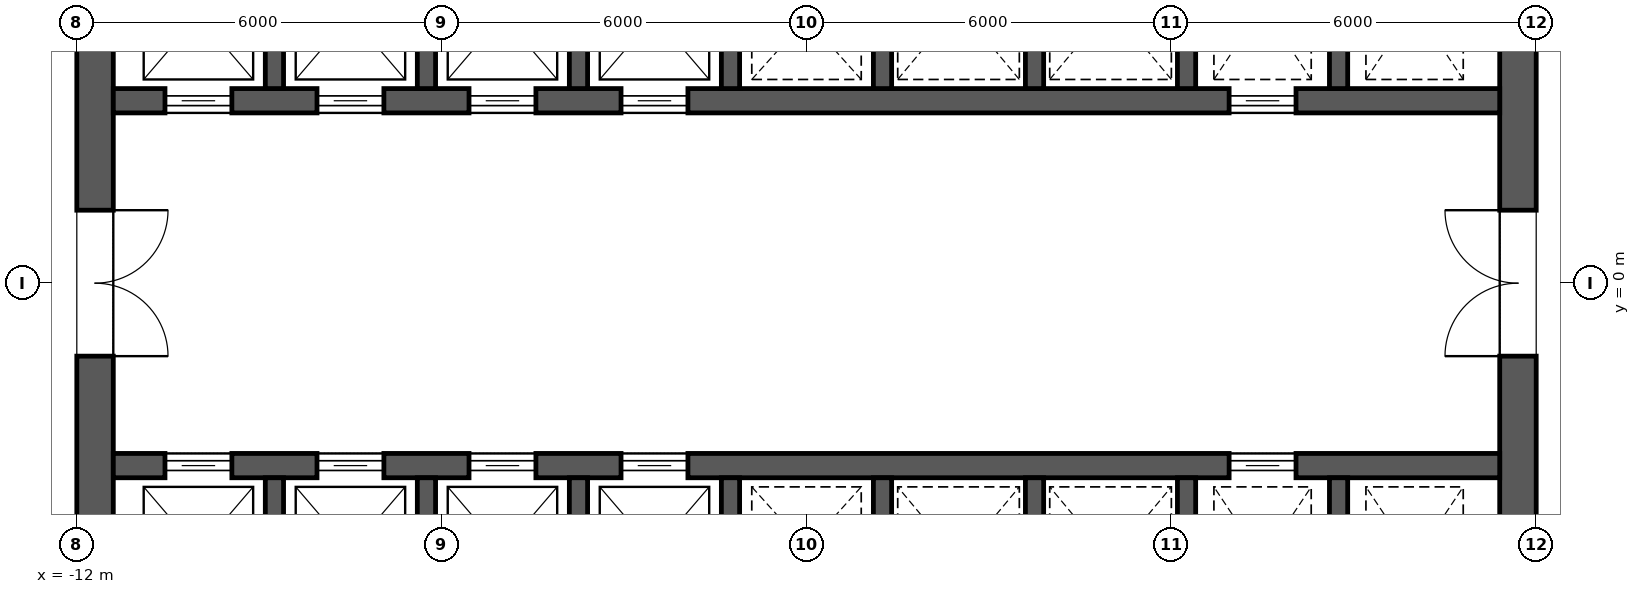
"""IFC4 building model, lengths in metres.
Left out: names, types, materials, properties, quantities, classifications, styles, units other than length and angle.
Written with IfcOpenShell. Run it as: python <this file> out.ifc"""

import sys

from ifc_helpers import new_model, si_unit, direction, frame, frame_2d, origin, place, context, subcontext, project, spatial, rectangle, extrude, element, fill, save


model = new_model("IFC4")
c1 = context("Model", 3, precision=1e-05, world=origin(), true_north=direction((0.0, 1.0)))
c2 = subcontext(c1, "Body", "Model", "MODEL_VIEW")
j1 = project(units=[si_unit("LENGTHUNIT", "METRE"), si_unit("PLANEANGLEUNIT", "RADIAN")], contexts=[c1])
p1 = place(None, origin())
s1 = spatial("IfcSite", under=j1, at=p1, CompositionType="ELEMENT")
p2 = place(p1, origin())
s2 = spatial("IfcBuilding", under=s1, at=p2, CompositionType="ELEMENT")
p3 = place(p2, frame((0.0, 0.0, 163.3)))
s3 = spatial("IfcBuildingStorey", under=s2, at=p3, CompositionType="ELEMENT", Elevation=163.3)
p4 = place(p3, frame((11.7, -11.4, 0.0), z_axis=(0.0, 0.0, 1.0), x_axis=(0.0, 1.0, 0.0)))
e1 = element("IfcWall", 1, at=p4, inside=s3, PredefinedType="SHEAR", context=c2, shape_type="SweptSolid", body=[
    extrude(rectangle(XDim=22.8, YDim=0.6, at=frame_2d((11.4, 0.0))), origin(), (0.0, 0.0, 1.0), 4.2),
])
p5 = place(p4, frame((10.2, 0.0, 0.0)))
e2 = element("IfcOpeningElement", 2, at=p5, cuts=e1, PredefinedType="OPENING", context=c2, shape_type="SweptSolid", body=[
    extrude(rectangle(XDim=2.4, YDim=2.1, at=frame_2d((1.2, 1.05))), frame((0.0, 0.312, 0.0), z_axis=(0.0, -1.0, 0.0), x_axis=(1.0, 0.0, 0.0)), (0.0, 0.0, 1.0), 0.624),
])
p6 = place(p4, frame((19.5, 0.0, 0.0)))
e3 = element("IfcOpeningElement", 3, at=p6, cuts=e1, PredefinedType="OPENING", context=c2, shape_type="SweptSolid", body=[
    extrude(rectangle(XDim=1.2, YDim=2.1, at=frame_2d((0.6, 1.05))), frame((0.0, 0.312, 0.0), z_axis=(0.0, -1.0, 0.0), x_axis=(1.0, 0.0, 0.0)), (0.0, 0.0, 1.0), 0.624),
])
p7 = place(p4, frame((2.1, 0.0, 0.0)))
e4 = element("IfcOpeningElement", 4, at=p7, cuts=e1, PredefinedType="OPENING", context=c2, shape_type="SweptSolid", body=[
    extrude(rectangle(XDim=1.2, YDim=2.1, at=frame_2d((0.6, 1.05))), frame((0.0, 0.312, 0.0), z_axis=(0.0, -1.0, 0.0), x_axis=(1.0, 0.0, 0.0)), (0.0, 0.0, 1.0), 0.624),
])
p8 = place(p3, frame((-11.7, -11.4, 0.0), z_axis=(0.0, 0.0, 1.0), x_axis=(0.0, 1.0, 0.0)))
e5 = element("IfcWall", 5, at=p8, inside=s3, PredefinedType="SHEAR", context=c2, shape_type="SweptSolid", body=[
    extrude(rectangle(XDim=22.8, YDim=0.6, at=frame_2d((11.4, 0.0))), origin(), (0.0, 0.0, 1.0), 4.2),
])
p9 = place(p8, frame((10.2, 0.0, 0.0)))
e6 = element("IfcOpeningElement", 6, at=p9, cuts=e5, PredefinedType="OPENING", context=c2, shape_type="SweptSolid", body=[
    extrude(rectangle(XDim=2.4, YDim=2.1, at=frame_2d((1.2, 1.05))), frame((0.0, 0.312, 0.0), z_axis=(0.0, -1.0, 0.0), x_axis=(1.0, 0.0, 0.0)), (0.0, 0.0, 1.0), 0.624),
])
p10 = place(p8, frame((18.925, 0.0, 0.0)))
e7 = element("IfcOpeningElement", 7, at=p10, cuts=e5, PredefinedType="OPENING", context=c2, shape_type="SweptSolid", body=[
    extrude(rectangle(XDim=1.2, YDim=2.1, at=frame_2d((0.6, 1.05))), frame((0.0, 0.312, 0.0), z_axis=(0.0, -1.0, 0.0), x_axis=(1.0, 0.0, 0.0)), (0.0, 0.0, 1.0), 0.624),
])
p11 = place(p8, frame((2.675, 0.0, 0.0)))
e8 = element("IfcOpeningElement", 8, at=p11, cuts=e5, PredefinedType="OPENING", context=c2, shape_type="SweptSolid", body=[
    extrude(rectangle(XDim=1.2, YDim=2.1, at=frame_2d((0.6, 1.05))), frame((0.0, 0.312, 0.0), z_axis=(0.0, -1.0, 0.0), x_axis=(1.0, 0.0, 0.0)), (0.0, 0.0, 1.0), 0.624),
])
p12 = place(p3, frame((-11.4, 3.0, 0.0), z_axis=(0.0, 0.0, 1.0), x_axis=(1.0, 0.0, 0.0)))
e9 = element("IfcWall", 9, at=p12, inside=s3, PredefinedType="SHEAR", context=c2, shape_type="SweptSolid", body=[
    extrude(rectangle(XDim=22.8, YDim=0.4, at=frame_2d((11.4, 0.0))), origin(), (0.0, 0.0, 1.0), 4.2),
])
p13 = place(p12, frame((0.85, 0.0, 0.0)))
e10 = element("IfcOpeningElement", 10, at=p13, cuts=e9, PredefinedType="OPENING", context=c2, shape_type="SweptSolid", body=[
    extrude(rectangle(XDim=1.1, YDim=2.1, at=frame_2d((0.55, 1.05))), frame((0.0, 0.212, 0.0), z_axis=(0.0, -1.0, 0.0), x_axis=(1.0, 0.0, 0.0)), (0.0, 0.0, 1.0), 0.424),
])
p14 = place(p12, frame((3.35, 0.0, 0.0)))
e11 = element("IfcOpeningElement", 11, at=p14, cuts=e9, PredefinedType="OPENING", context=c2, shape_type="SweptSolid", body=[
    extrude(rectangle(XDim=1.1, YDim=2.1, at=frame_2d((0.55, 1.05))), frame((0.0, 0.212, 0.0), z_axis=(0.0, -1.0, 0.0), x_axis=(1.0, 0.0, 0.0)), (0.0, 0.0, 1.0), 0.424),
])
p15 = place(p12, frame((5.85, 0.0, 0.0)))
e12 = element("IfcOpeningElement", 12, at=p15, cuts=e9, PredefinedType="OPENING", context=c2, shape_type="SweptSolid", body=[
    extrude(rectangle(XDim=1.1, YDim=2.1, at=frame_2d((0.55, 1.05))), frame((0.0, 0.212, 0.0), z_axis=(0.0, -1.0, 0.0), x_axis=(1.0, 0.0, 0.0)), (0.0, 0.0, 1.0), 0.424),
])
p16 = place(p12, frame((8.35, 0.0, 0.0)))
e13 = element("IfcOpeningElement", 13, at=p16, cuts=e9, PredefinedType="OPENING", context=c2, shape_type="SweptSolid", body=[
    extrude(rectangle(XDim=1.1, YDim=2.1, at=frame_2d((0.55, 1.05))), frame((0.0, 0.212, 0.0), z_axis=(0.0, -1.0, 0.0), x_axis=(1.0, 0.0, 0.0)), (0.0, 0.0, 1.0), 0.424),
])
p17 = place(p12, frame((18.35, 0.0, 0.0)))
e14 = element("IfcOpeningElement", 14, at=p17, cuts=e9, PredefinedType="OPENING", context=c2, shape_type="SweptSolid", body=[
    extrude(rectangle(XDim=1.1, YDim=2.1, at=frame_2d((0.55, 1.05))), frame((0.0, 0.212, 0.0), z_axis=(0.0, -1.0, 0.0), x_axis=(1.0, 0.0, 0.0)), (0.0, 0.0, 1.0), 0.424),
])
for number, where, z_axis, x_axis in (
    (15, (-8.75, 3.2, 0.0), (0.0, 0.0, 1.0), (0.0, 1.0, 0.0)),
    (16, (-6.25, 3.2, 0.0), (0.0, 0.0, 1.0), (0.0, 1.0, 0.0)),
    (17, (-3.75, 3.2, 0.0), (0.0, 0.0, 1.0), (0.0, 1.0, 0.0)),
    (18, (-1.25, 3.2, 0.0), (0.0, 0.0, 1.0), (0.0, 1.0, 0.0)),
    (19, (1.25, 3.2, 0.0), (0.0, 0.0, 1.0), (0.0, 1.0, 0.0)),
    (20, (3.75, 3.2, 0.0), (0.0, 0.0, 1.0), (0.0, 1.0, 0.0)),
    (21, (6.25, 3.2, 0.0), (0.0, 0.0, 1.0), (0.0, 1.0, 0.0)),
    (22, (8.75, 3.2, 0.0), (0.0, 0.0, 1.0), (0.0, 1.0, 0.0)),
):
    element("IfcWall", number, at=place(p3, frame(where, z_axis=z_axis, x_axis=x_axis)), inside=s3, PredefinedType="SHEAR", context=c2, shape_type="SweptSolid", body=[
        extrude(rectangle(XDim=2.9, YDim=0.3, at=frame_2d((1.45, 0.0))), origin(), (0.0, 0.0, 1.0), 4.2),
    ])
p18 = place(p3, frame((-11.4, -3.0, 0.0), z_axis=(0.0, 0.0, 1.0), x_axis=(1.0, 0.0, 0.0)))
e23 = element("IfcWall", 23, at=p18, inside=s3, PredefinedType="SHEAR", context=c2, shape_type="SweptSolid", body=[
    extrude(rectangle(XDim=22.8, YDim=0.4, at=frame_2d((11.4, 0.0))), origin(), (0.0, 0.0, 1.0), 4.2),
])
p19 = place(p18, frame((0.85, 0.0, 0.0)))
e24 = element("IfcOpeningElement", 24, at=p19, cuts=e23, PredefinedType="OPENING", context=c2, shape_type="SweptSolid", body=[
    extrude(rectangle(XDim=1.1, YDim=2.1, at=frame_2d((0.55, 1.05))), frame((0.0, 0.212, 0.0), z_axis=(0.0, -1.0, 0.0), x_axis=(1.0, 0.0, 0.0)), (0.0, 0.0, 1.0), 0.424),
])
p20 = place(p18, frame((3.35, 0.0, 0.0)))
e25 = element("IfcOpeningElement", 25, at=p20, cuts=e23, PredefinedType="OPENING", context=c2, shape_type="SweptSolid", body=[
    extrude(rectangle(XDim=1.1, YDim=2.1, at=frame_2d((0.55, 1.05))), frame((0.0, 0.212, 0.0), z_axis=(0.0, -1.0, 0.0), x_axis=(1.0, 0.0, 0.0)), (0.0, 0.0, 1.0), 0.424),
])
p21 = place(p18, frame((5.85, 0.0, 0.0)))
e26 = element("IfcOpeningElement", 26, at=p21, cuts=e23, PredefinedType="OPENING", context=c2, shape_type="SweptSolid", body=[
    extrude(rectangle(XDim=1.1, YDim=2.1, at=frame_2d((0.55, 1.05))), frame((0.0, 0.212, 0.0), z_axis=(0.0, -1.0, 0.0), x_axis=(1.0, 0.0, 0.0)), (0.0, 0.0, 1.0), 0.424),
])
p22 = place(p18, frame((8.35, 0.0, 0.0)))
e27 = element("IfcOpeningElement", 27, at=p22, cuts=e23, PredefinedType="OPENING", context=c2, shape_type="SweptSolid", body=[
    extrude(rectangle(XDim=1.1, YDim=2.1, at=frame_2d((0.55, 1.05))), frame((0.0, 0.212, 0.0), z_axis=(0.0, -1.0, 0.0), x_axis=(1.0, 0.0, 0.0)), (0.0, 0.0, 1.0), 0.424),
])
p23 = place(p18, frame((18.35, 0.0, 0.0)))
e28 = element("IfcOpeningElement", 28, at=p23, cuts=e23, PredefinedType="OPENING", context=c2, shape_type="SweptSolid", body=[
    extrude(rectangle(XDim=1.1, YDim=2.1, at=frame_2d((0.55, 1.05))), frame((0.0, 0.212, 0.0), z_axis=(0.0, -1.0, 0.0), x_axis=(1.0, 0.0, 0.0)), (0.0, 0.0, 1.0), 0.424),
])
for number, where, z_axis, x_axis in (
    (29, (-8.75, -6.1, 0.0), (0.0, 0.0, 1.0), (0.0, 1.0, 0.0)),
    (30, (-6.25, -6.1, 0.0), (0.0, 0.0, 1.0), (0.0, 1.0, 0.0)),
    (31, (-3.75, -6.1, 0.0), (0.0, 0.0, 1.0), (0.0, 1.0, 0.0)),
    (32, (-1.25, -6.1, 0.0), (0.0, 0.0, 1.0), (0.0, 1.0, 0.0)),
    (33, (1.25, -6.1, 0.0), (0.0, 0.0, 1.0), (0.0, 1.0, 0.0)),
    (34, (3.75, -6.1, 0.0), (0.0, 0.0, 1.0), (0.0, 1.0, 0.0)),
    (35, (6.25, -6.1, 0.0), (0.0, 0.0, 1.0), (0.0, 1.0, 0.0)),
    (36, (8.75, -6.1, 0.0), (0.0, 0.0, 1.0), (0.0, 1.0, 0.0)),
):
    element("IfcWall", number, at=place(p3, frame(where, z_axis=z_axis, x_axis=x_axis)), inside=s3, PredefinedType="SHEAR", context=c2, shape_type="SweptSolid", body=[
        extrude(rectangle(XDim=2.9, YDim=0.3, at=frame_2d((1.45, 0.0))), origin(), (0.0, 0.0, 1.0), 4.2),
    ])
p24 = place(p13, origin())
e37 = element("IfcDoor", 37, at=p24, inside=s3, OperationType="SLIDING_TO_LEFT", PredefinedType="DOOR", context=c2, shape_type="SweptSolid", body=[
    extrude(rectangle(XDim=1.1, YDim=2.1, at=frame_2d((0.55, 1.05))), frame((0.0, 0.025, 0.0), z_axis=(0.0, -1.0, 0.0), x_axis=(1.0, 0.0, 0.0)), (0.0, 0.0, 1.0), 0.05),
])
fill(e10, e37)
p25 = place(p14, origin())
e38 = element("IfcDoor", 38, at=p25, inside=s3, OperationType="SLIDING_TO_LEFT", PredefinedType="DOOR", context=c2, shape_type="SweptSolid", body=[
    extrude(rectangle(XDim=1.1, YDim=2.1, at=frame_2d((0.55, 1.05))), frame((0.0, 0.025, 0.0), z_axis=(0.0, -1.0, 0.0), x_axis=(1.0, 0.0, 0.0)), (0.0, 0.0, 1.0), 0.05),
])
fill(e11, e38)
p26 = place(p15, origin())
e39 = element("IfcDoor", 39, at=p26, inside=s3, OperationType="SLIDING_TO_LEFT", PredefinedType="DOOR", context=c2, shape_type="SweptSolid", body=[
    extrude(rectangle(XDim=1.1, YDim=2.1, at=frame_2d((0.55, 1.05))), frame((0.0, 0.025, 0.0), z_axis=(0.0, -1.0, 0.0), x_axis=(1.0, 0.0, 0.0)), (0.0, 0.0, 1.0), 0.05),
])
fill(e12, e39)
p27 = place(p16, origin())
e40 = element("IfcDoor", 40, at=p27, inside=s3, OperationType="SLIDING_TO_LEFT", PredefinedType="DOOR", context=c2, shape_type="SweptSolid", body=[
    extrude(rectangle(XDim=1.1, YDim=2.1, at=frame_2d((0.55, 1.05))), frame((0.0, 0.025, 0.0), z_axis=(0.0, -1.0, 0.0), x_axis=(1.0, 0.0, 0.0)), (0.0, 0.0, 1.0), 0.05),
])
fill(e13, e40)
p28 = place(p19, origin())
e41 = element("IfcDoor", 41, at=p28, inside=s3, OperationType="SLIDING_TO_LEFT", PredefinedType="DOOR", context=c2, shape_type="SweptSolid", body=[
    extrude(rectangle(XDim=1.1, YDim=2.1, at=frame_2d((0.55, 1.05))), frame((0.0, 0.025, 0.0), z_axis=(0.0, -1.0, 0.0), x_axis=(1.0, 0.0, 0.0)), (0.0, 0.0, 1.0), 0.05),
])
fill(e24, e41)
p29 = place(p20, origin())
e42 = element("IfcDoor", 42, at=p29, inside=s3, OperationType="SLIDING_TO_LEFT", PredefinedType="DOOR", context=c2, shape_type="SweptSolid", body=[
    extrude(rectangle(XDim=1.1, YDim=2.1, at=frame_2d((0.55, 1.05))), frame((0.0, 0.025, 0.0), z_axis=(0.0, -1.0, 0.0), x_axis=(1.0, 0.0, 0.0)), (0.0, 0.0, 1.0), 0.05),
])
fill(e25, e42)
p30 = place(p21, origin())
e43 = element("IfcDoor", 43, at=p30, inside=s3, OperationType="SLIDING_TO_LEFT", PredefinedType="DOOR", context=c2, shape_type="SweptSolid", body=[
    extrude(rectangle(XDim=1.1, YDim=2.1, at=frame_2d((0.55, 1.05))), frame((0.0, 0.025, 0.0), z_axis=(0.0, -1.0, 0.0), x_axis=(1.0, 0.0, 0.0)), (0.0, 0.0, 1.0), 0.05),
])
fill(e26, e43)
p31 = place(p22, origin())
e44 = element("IfcDoor", 44, at=p31, inside=s3, OperationType="SLIDING_TO_LEFT", PredefinedType="DOOR", context=c2, shape_type="SweptSolid", body=[
    extrude(rectangle(XDim=1.1, YDim=2.1, at=frame_2d((0.55, 1.05))), frame((0.0, 0.025, 0.0), z_axis=(0.0, -1.0, 0.0), x_axis=(1.0, 0.0, 0.0)), (0.0, 0.0, 1.0), 0.05),
])
fill(e27, e44)
p32 = place(p17, origin())
e45 = element("IfcDoor", 45, at=p32, inside=s3, OperationType="SLIDING_TO_LEFT", PredefinedType="DOOR", context=c2, shape_type="SweptSolid", body=[
    extrude(rectangle(XDim=1.1, YDim=2.1, at=frame_2d((0.55, 1.05))), frame((0.0, 0.025, 0.0), z_axis=(0.0, -1.0, 0.0), x_axis=(1.0, 0.0, 0.0)), (0.0, 0.0, 1.0), 0.05),
])
fill(e14, e45)
p33 = place(p23, origin())
e46 = element("IfcDoor", 46, at=p33, inside=s3, OperationType="SLIDING_TO_LEFT", PredefinedType="DOOR", context=c2, shape_type="SweptSolid", body=[
    extrude(rectangle(XDim=1.1, YDim=2.1, at=frame_2d((0.55, 1.05))), frame((0.0, 0.025, 0.0), z_axis=(0.0, -1.0, 0.0), x_axis=(1.0, 0.0, 0.0)), (0.0, 0.0, 1.0), 0.05),
])
fill(e28, e46)
p34 = place(p9, frame((2.4, 0.0, 0.0), z_axis=(0.0, 0.0, 1.0), x_axis=(-1.0, 0.0, 0.0)))
e47 = element("IfcDoor", 47, at=p34, inside=s3, OperationType="DOUBLE_DOOR_SINGLE_SWING", PredefinedType="DOOR", context=c2, shape_type="SweptSolid", body=[
    extrude(rectangle(XDim=2.4, YDim=2.1, at=frame_2d((1.2, 1.05))), frame((0.0, 0.025, 0.0), z_axis=(0.0, -1.0, 0.0), x_axis=(1.0, 0.0, 0.0)), (0.0, 0.0, 1.0), 0.05),
])
fill(e6, e47)
p35 = place(p5, origin())
e48 = element("IfcDoor", 48, at=p35, inside=s3, OperationType="DOUBLE_DOOR_SINGLE_SWING", PredefinedType="DOOR", context=c2, shape_type="SweptSolid", body=[
    extrude(rectangle(XDim=2.4, YDim=2.1, at=frame_2d((1.2, 1.05))), frame((0.0, 0.025, 0.0), z_axis=(0.0, -1.0, 0.0), x_axis=(1.0, 0.0, 0.0)), (0.0, 0.0, 1.0), 0.05),
])
fill(e2, e48)
save(model, sys.argv[1])
